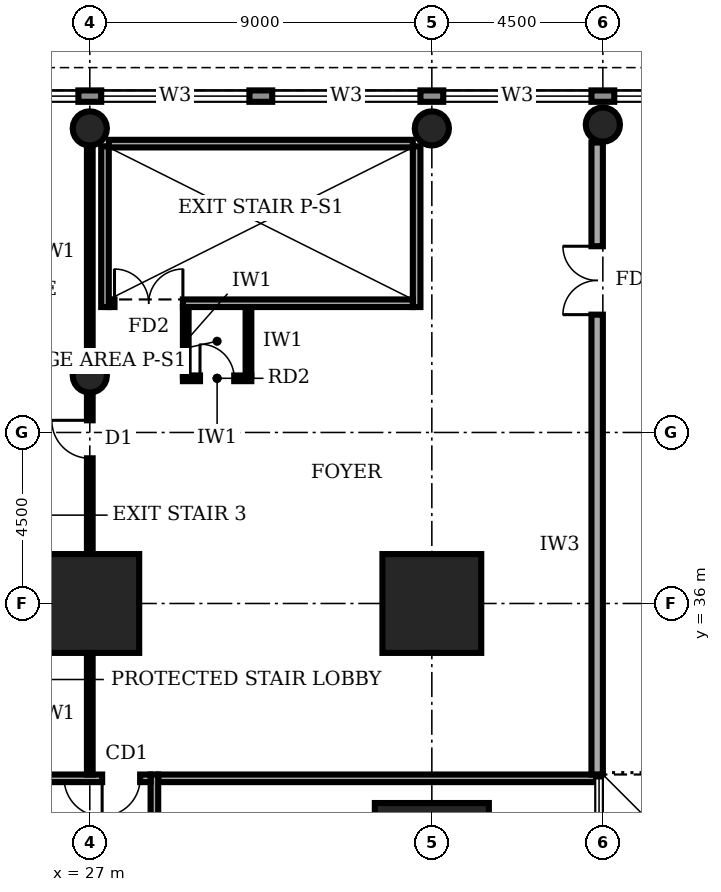
"""IFC4 building model, lengths in metres.
Left out: names, types, materials, properties, quantities, classifications, styles, units other than length and angle.
Written with IfcOpenShell. Run it as: python <this file> out.ifc"""

import sys

from ifc_helpers import new_model, si_unit, direction, frame, frame_2d, origin, origin_2d, place, context, subcontext, project, spatial, rectangle, circle, extrude, element, fill, save


model = new_model("IFC4")
c1 = context("Model", 3, precision=1e-05, world=origin(), true_north=direction((0.0, 1.0)))
c2 = subcontext(c1, "Body", "Model", "MODEL_VIEW")
j1 = project(units=[si_unit("LENGTHUNIT", "METRE"), si_unit("PLANEANGLEUNIT", "RADIAN")], contexts=[c1])
p1 = place(None, origin())
s1 = spatial("IfcSite", under=j1, at=p1, CompositionType="ELEMENT")
p2 = place(p1, origin())
s2 = spatial("IfcBuilding", under=s1, at=p2, CompositionType="ELEMENT")
p3 = place(p2, frame((0.0, 0.0, 16.0)))
s3 = spatial("IfcBuildingStorey", under=s2, at=p3, CompositionType="ELEMENT", Elevation=16.0)
p4 = place(p3, frame((36.0, 29.25, 0.0), z_axis=(0.0, 0.0, 1.0), x_axis=(1.0, 0.0, 0.0)))
e1 = element("IfcColumn", 1, at=p4, inside=s3, PredefinedType="COLUMN", context=c2, shape_type="SweptSolid", body=[
    extrude(rectangle(XDim=3.0, YDim=3.0, at=origin_2d()), origin(), (0.0, 0.0, 1.0), 5.0),
])
for number, where, z_axis, x_axis in (
    (2, (27.0, 36.0, 0.0), (0.0, 0.0, 1.0), (1.0, 0.0, 0.0)),
    (3, (36.0, 36.0, 0.0), (0.0, 0.0, 1.0), (1.0, 0.0, 0.0)),
):
    element("IfcColumn", number, at=place(p3, frame(where, z_axis=z_axis, x_axis=x_axis)), inside=s3, PredefinedType="COLUMN", context=c2, shape_type="SweptSolid", body=[
        extrude(rectangle(XDim=2.6, YDim=2.6, at=origin_2d()), origin(), (0.0, 0.0, 1.0), 5.0),
    ])
for number, where, z_axis, x_axis in (
    (4, (27.0, 42.0, 0.0), (0.0, 0.0, 1.0), (1.0, 0.0, 0.0)),
    (5, (27.0, 48.5, 0.0), (0.0, 0.0, 1.0), (1.0, 0.0, 0.0)),
    (6, (36.0, 48.5, 0.0), (0.0, 0.0, 1.0), (1.0, 0.0, 0.0)),
    (7, (40.5, 48.6, 0.0), (0.0, 0.0, 1.0), (1.0, 0.0, 0.0)),
):
    element("IfcColumn", number, at=place(p3, frame(where, z_axis=z_axis, x_axis=x_axis)), inside=s3, PredefinedType="COLUMN", context=c2, shape_type="SweptSolid", body=[
        extrude(circle(Radius=0.45, at=origin_2d()), origin(), (0.0, 0.0, 1.0), 5.0),
    ])
p5 = place(p3, frame((98.98, 49.35, 0.0), z_axis=(0.0, 0.0, 1.0), x_axis=(-1.0, 0.0, 0.0)))
e8 = element("IfcWall", 8, at=p5, inside=s3, PredefinedType="STANDARD", context=c2, shape_type="SweptSolid", body=[
    extrude(rectangle(XDim=98.96, YDim=0.3, at=frame_2d((49.48, 0.0))), origin(), (0.0, 0.0, 1.0), 4.7),
])
p6 = place(p5, frame((94.78, 0.0, 0.95)))
e9 = element("IfcOpeningElement", 9, at=p6, cuts=e8, PredefinedType="OPENING", context=c2, shape_type="SweptSolid", body=[
    extrude(rectangle(XDim=3.9, YDim=1.8, at=frame_2d((1.95, 0.9))), frame((0.0, 0.16, 0.0), z_axis=(0.0, -1.0, 0.0), x_axis=(1.0, 0.0, 0.0)), (0.0, 0.0, 1.0), 0.32),
])
p7 = place(p5, frame((90.28, 0.0, 0.95)))
e10 = element("IfcOpeningElement", 10, at=p7, cuts=e8, PredefinedType="OPENING", context=c2, shape_type="SweptSolid", body=[
    extrude(rectangle(XDim=3.9, YDim=1.8, at=frame_2d((1.95, 0.9))), frame((0.0, 0.16, 0.0), z_axis=(0.0, -1.0, 0.0), x_axis=(1.0, 0.0, 0.0)), (0.0, 0.0, 1.0), 0.32),
])
p8 = place(p5, frame((85.78, 0.0, 0.95)))
e11 = element("IfcOpeningElement", 11, at=p8, cuts=e8, PredefinedType="OPENING", context=c2, shape_type="SweptSolid", body=[
    extrude(rectangle(XDim=3.9, YDim=1.8, at=frame_2d((1.95, 0.9))), frame((0.0, 0.16, 0.0), z_axis=(0.0, -1.0, 0.0), x_axis=(1.0, 0.0, 0.0)), (0.0, 0.0, 1.0), 0.32),
])
p9 = place(p5, frame((81.28, 0.0, 0.95)))
e12 = element("IfcOpeningElement", 12, at=p9, cuts=e8, PredefinedType="OPENING", context=c2, shape_type="SweptSolid", body=[
    extrude(rectangle(XDim=3.9, YDim=1.8, at=frame_2d((1.95, 0.9))), frame((0.0, 0.16, 0.0), z_axis=(0.0, -1.0, 0.0), x_axis=(1.0, 0.0, 0.0)), (0.0, 0.0, 1.0), 0.32),
])
p10 = place(p5, frame((76.78, 0.0, 0.95)))
e13 = element("IfcOpeningElement", 13, at=p10, cuts=e8, PredefinedType="OPENING", context=c2, shape_type="SweptSolid", body=[
    extrude(rectangle(XDim=3.9, YDim=1.8, at=frame_2d((1.95, 0.9))), frame((0.0, 0.16, 0.0), z_axis=(0.0, -1.0, 0.0), x_axis=(1.0, 0.0, 0.0)), (0.0, 0.0, 1.0), 0.32),
])
p11 = place(p5, frame((72.28, 0.0, 0.95)))
e14 = element("IfcOpeningElement", 14, at=p11, cuts=e8, PredefinedType="OPENING", context=c2, shape_type="SweptSolid", body=[
    extrude(rectangle(XDim=3.9, YDim=1.8, at=frame_2d((1.95, 0.9))), frame((0.0, 0.16, 0.0), z_axis=(0.0, -1.0, 0.0), x_axis=(1.0, 0.0, 0.0)), (0.0, 0.0, 1.0), 0.32),
])
p12 = place(p5, frame((67.78, 0.0, 0.95)))
e15 = element("IfcOpeningElement", 15, at=p12, cuts=e8, PredefinedType="OPENING", context=c2, shape_type="SweptSolid", body=[
    extrude(rectangle(XDim=3.9, YDim=1.8, at=frame_2d((1.95, 0.9))), frame((0.0, 0.16, 0.0), z_axis=(0.0, -1.0, 0.0), x_axis=(1.0, 0.0, 0.0)), (0.0, 0.0, 1.0), 0.32),
])
p13 = place(p5, frame((63.28, 0.0, 0.95)))
e16 = element("IfcOpeningElement", 16, at=p13, cuts=e8, PredefinedType="OPENING", context=c2, shape_type="SweptSolid", body=[
    extrude(rectangle(XDim=3.9, YDim=1.8, at=frame_2d((1.95, 0.9))), frame((0.0, 0.16, 0.0), z_axis=(0.0, -1.0, 0.0), x_axis=(1.0, 0.0, 0.0)), (0.0, 0.0, 1.0), 0.32),
])
p14 = place(p5, frame((58.78, 0.0, 0.95)))
e17 = element("IfcOpeningElement", 17, at=p14, cuts=e8, PredefinedType="OPENING", context=c2, shape_type="SweptSolid", body=[
    extrude(rectangle(XDim=3.9, YDim=1.8, at=frame_2d((1.95, 0.9))), frame((0.0, 0.16, 0.0), z_axis=(0.0, -1.0, 0.0), x_axis=(1.0, 0.0, 0.0)), (0.0, 0.0, 1.0), 0.32),
])
p15 = place(p5, frame((54.28, 0.0, 0.95)))
e18 = element("IfcOpeningElement", 18, at=p15, cuts=e8, PredefinedType="OPENING", context=c2, shape_type="SweptSolid", body=[
    extrude(rectangle(XDim=3.9, YDim=1.8, at=frame_2d((1.95, 0.9))), frame((0.0, 0.16, 0.0), z_axis=(0.0, -1.0, 0.0), x_axis=(1.0, 0.0, 0.0)), (0.0, 0.0, 1.0), 0.32),
])
p16 = place(p5, frame((49.78, 0.0, 0.95)))
e19 = element("IfcOpeningElement", 19, at=p16, cuts=e8, PredefinedType="OPENING", context=c2, shape_type="SweptSolid", body=[
    extrude(rectangle(XDim=3.9, YDim=1.8, at=frame_2d((1.95, 0.9))), frame((0.0, 0.16, 0.0), z_axis=(0.0, -1.0, 0.0), x_axis=(1.0, 0.0, 0.0)), (0.0, 0.0, 1.0), 0.32),
])
p17 = place(p5, frame((45.28, 0.0, 0.95)))
e20 = element("IfcOpeningElement", 20, at=p17, cuts=e8, PredefinedType="OPENING", context=c2, shape_type="SweptSolid", body=[
    extrude(rectangle(XDim=3.9, YDim=1.8, at=frame_2d((1.95, 0.9))), frame((0.0, 0.16, 0.0), z_axis=(0.0, -1.0, 0.0), x_axis=(1.0, 0.0, 0.0)), (0.0, 0.0, 1.0), 0.32),
])
p18 = place(p5, frame((40.78, 0.0, 0.95)))
e21 = element("IfcOpeningElement", 21, at=p18, cuts=e8, PredefinedType="OPENING", context=c2, shape_type="SweptSolid", body=[
    extrude(rectangle(XDim=3.9, YDim=1.8, at=frame_2d((1.95, 0.9))), frame((0.0, 0.16, 0.0), z_axis=(0.0, -1.0, 0.0), x_axis=(1.0, 0.0, 0.0)), (0.0, 0.0, 1.0), 0.32),
])
p19 = place(p5, frame((36.28, 0.0, 0.95)))
e22 = element("IfcOpeningElement", 22, at=p19, cuts=e8, PredefinedType="OPENING", context=c2, shape_type="SweptSolid", body=[
    extrude(rectangle(XDim=3.9, YDim=1.8, at=frame_2d((1.95, 0.9))), frame((0.0, 0.16, 0.0), z_axis=(0.0, -1.0, 0.0), x_axis=(1.0, 0.0, 0.0)), (0.0, 0.0, 1.0), 0.32),
])
p20 = place(p5, frame((31.78, 0.0, 0.95)))
e23 = element("IfcOpeningElement", 23, at=p20, cuts=e8, PredefinedType="OPENING", context=c2, shape_type="SweptSolid", body=[
    extrude(rectangle(XDim=3.9, YDim=1.8, at=frame_2d((1.95, 0.9))), frame((0.0, 0.16, 0.0), z_axis=(0.0, -1.0, 0.0), x_axis=(1.0, 0.0, 0.0)), (0.0, 0.0, 1.0), 0.32),
])
p21 = place(p5, frame((27.28, 0.0, 0.95)))
e24 = element("IfcOpeningElement", 24, at=p21, cuts=e8, PredefinedType="OPENING", context=c2, shape_type="SweptSolid", body=[
    extrude(rectangle(XDim=3.9, YDim=1.8, at=frame_2d((1.95, 0.9))), frame((0.0, 0.16, 0.0), z_axis=(0.0, -1.0, 0.0), x_axis=(1.0, 0.0, 0.0)), (0.0, 0.0, 1.0), 0.32),
])
p22 = place(p5, frame((22.78, 0.0, 0.95)))
e25 = element("IfcOpeningElement", 25, at=p22, cuts=e8, PredefinedType="OPENING", context=c2, shape_type="SweptSolid", body=[
    extrude(rectangle(XDim=3.9, YDim=1.8, at=frame_2d((1.95, 0.9))), frame((0.0, 0.16, 0.0), z_axis=(0.0, -1.0, 0.0), x_axis=(1.0, 0.0, 0.0)), (0.0, 0.0, 1.0), 0.32),
])
p23 = place(p5, frame((18.28, 0.0, 0.95)))
e26 = element("IfcOpeningElement", 26, at=p23, cuts=e8, PredefinedType="OPENING", context=c2, shape_type="SweptSolid", body=[
    extrude(rectangle(XDim=3.9, YDim=1.8, at=frame_2d((1.95, 0.9))), frame((0.0, 0.16, 0.0), z_axis=(0.0, -1.0, 0.0), x_axis=(1.0, 0.0, 0.0)), (0.0, 0.0, 1.0), 0.32),
])
p24 = place(p5, frame((13.78, 0.0, 0.95)))
e27 = element("IfcOpeningElement", 27, at=p24, cuts=e8, PredefinedType="OPENING", context=c2, shape_type="SweptSolid", body=[
    extrude(rectangle(XDim=3.9, YDim=1.8, at=frame_2d((1.95, 0.9))), frame((0.0, 0.16, 0.0), z_axis=(0.0, -1.0, 0.0), x_axis=(1.0, 0.0, 0.0)), (0.0, 0.0, 1.0), 0.32),
])
p25 = place(p5, frame((9.28, 0.0, 0.95)))
e28 = element("IfcOpeningElement", 28, at=p25, cuts=e8, PredefinedType="OPENING", context=c2, shape_type="SweptSolid", body=[
    extrude(rectangle(XDim=3.9, YDim=1.8, at=frame_2d((1.95, 0.9))), frame((0.0, 0.16, 0.0), z_axis=(0.0, -1.0, 0.0), x_axis=(1.0, 0.0, 0.0)), (0.0, 0.0, 1.0), 0.32),
])
p26 = place(p5, frame((4.78, 0.0, 0.95)))
e29 = element("IfcOpeningElement", 29, at=p26, cuts=e8, PredefinedType="OPENING", context=c2, shape_type="SweptSolid", body=[
    extrude(rectangle(XDim=3.9, YDim=1.8, at=frame_2d((1.95, 0.9))), frame((0.0, 0.16, 0.0), z_axis=(0.0, -1.0, 0.0), x_axis=(1.0, 0.0, 0.0)), (0.0, 0.0, 1.0), 0.32),
])
p27 = place(p3, frame((28.7, 9.2, 0.0), z_axis=(0.0, 0.0, 1.0), x_axis=(0.0, 1.0, 0.0)))
e30 = element("IfcWall", 30, at=p27, inside=s3, PredefinedType="SOLIDWALL", context=c2, shape_type="SweptSolid", body=[
    extrude(rectangle(XDim=22.3, YDim=0.2, at=frame_2d((11.15, 0.0))), origin(), (0.0, 0.0, 1.0), 4.7),
])
p28 = place(p27, frame((3.4, 0.0, 0.0)))
e31 = element("IfcOpeningElement", 31, at=p28, cuts=e30, PredefinedType="OPENING", context=c2, shape_type="SweptSolid", body=[
    extrude(rectangle(XDim=1.8, YDim=2.1, at=frame_2d((0.9, 1.05))), frame((0.0, 0.11, 0.0), z_axis=(0.0, -1.0, 0.0), x_axis=(1.0, 0.0, 0.0)), (0.0, 0.0, 1.0), 0.22),
])
p29 = place(p27, frame((14.65, 0.0, 0.0)))
e32 = element("IfcOpeningElement", 32, at=p29, cuts=e30, PredefinedType="OPENING", context=c2, shape_type="SweptSolid", body=[
    extrude(rectangle(XDim=1.8, YDim=2.1, at=frame_2d((0.9, 1.05))), frame((0.0, 0.11, 0.0), z_axis=(0.0, -1.0, 0.0), x_axis=(1.0, 0.0, 0.0)), (0.0, 0.0, 1.0), 0.22),
])
p30 = place(p3, frame((28.6, 31.4, 0.0), z_axis=(0.0, 0.0, 1.0), x_axis=(-1.0, 0.0, 0.0)))
e33 = element("IfcWall", 33, at=p30, inside=s3, PredefinedType="SOLIDWALL", context=c2, shape_type="SweptSolid", body=[
    extrude(rectangle(XDim=16.9, YDim=0.2, at=frame_2d((8.45, 0.0))), origin(), (0.0, 0.0, 1.0), 4.7),
])
p31 = place(p30, frame((15.425, 0.0, 0.0)))
e34 = element("IfcOpeningElement", 34, at=p31, cuts=e33, PredefinedType="OPENING", context=c2, shape_type="SweptSolid", body=[
    extrude(rectangle(XDim=1.0, YDim=2.1, at=frame_2d((0.5, 1.05))), frame((0.0, 0.11, 0.0), z_axis=(0.0, -1.0, 0.0), x_axis=(1.0, 0.0, 0.0)), (0.0, 0.0, 1.0), 0.22),
])
p32 = place(p30, frame((9.7, 0.0, 0.0)))
e35 = element("IfcOpeningElement", 35, at=p32, cuts=e33, PredefinedType="OPENING", context=c2, shape_type="SweptSolid", body=[
    extrude(rectangle(XDim=1.8, YDim=2.1, at=frame_2d((0.9, 1.05))), frame((0.0, 0.11, 0.0), z_axis=(0.0, -1.0, 0.0), x_axis=(1.0, 0.0, 0.0)), (0.0, 0.0, 1.0), 0.22),
])
p33 = place(p30, frame((0.275, 0.0, 0.0)))
e36 = element("IfcOpeningElement", 36, at=p33, cuts=e33, PredefinedType="OPENING", context=c2, shape_type="SweptSolid", body=[
    extrude(rectangle(XDim=1.0, YDim=2.1, at=frame_2d((0.5, 1.05))), frame((0.0, 0.11, 0.0), z_axis=(0.0, -1.0, 0.0), x_axis=(1.0, 0.0, 0.0)), (0.0, 0.0, 1.0), 0.22),
])
p34 = place(p30, frame((3.35, 0.0, 0.0)))
e37 = element("IfcOpeningElement", 37, at=p34, cuts=e33, PredefinedType="OPENING", context=c2, shape_type="SweptSolid", body=[
    extrude(rectangle(XDim=1.0, YDim=2.1, at=frame_2d((0.5, 1.05))), frame((0.0, 0.11, 0.0), z_axis=(0.0, -1.0, 0.0), x_axis=(1.0, 0.0, 0.0)), (0.0, 0.0, 1.0), 0.22),
])
p35 = place(p3, frame((28.8, 31.4, 0.0), z_axis=(0.0, 0.0, 1.0), x_axis=(1.0, 0.0, 0.0)))
e38 = element("IfcWall", 38, at=p35, inside=s3, PredefinedType="SOLIDWALL", context=c2, shape_type="SweptSolid", body=[
    extrude(rectangle(XDim=11.52, YDim=0.2, at=frame_2d((5.76, 0.0))), origin(), (0.0, 0.0, 1.0), 4.7),
])
p36 = place(p3, frame((27.0, 31.5, 0.0), z_axis=(0.0, 0.0, 1.0), x_axis=(0.0, 1.0, 0.0)))
e39 = element("IfcWall", 39, at=p36, inside=s3, PredefinedType="PARTITIONING", context=c2, shape_type="SweptSolid", body=[
    extrude(rectangle(XDim=3.18, YDim=0.15, at=frame_2d((1.59, 0.0))), origin(), (0.0, 0.0, 1.0), 3.8),
])
p37 = place(p3, frame((27.0, 37.32, 0.0), z_axis=(0.0, 0.0, 1.0), x_axis=(0.0, 1.0, 0.0)))
e40 = element("IfcWall", 40, at=p37, inside=s3, PredefinedType="PARTITIONING", context=c2, shape_type="SweptSolid", body=[
    extrude(rectangle(XDim=4.21, YDim=0.15, at=frame_2d((2.105, 0.0))), origin(), (0.0, 0.0, 1.0), 3.7),
])
p38 = place(p37, frame((2.5, 0.0, 0.0)))
e41 = element("IfcOpeningElement", 41, at=p38, cuts=e40, PredefinedType="OPENING", context=c2, shape_type="SweptSolid", body=[
    extrude(rectangle(XDim=1.0, YDim=2.1, at=frame_2d((0.5, 1.05))), frame((0.0, 0.085, 0.0), z_axis=(0.0, -1.0, 0.0), x_axis=(1.0, 0.0, 0.0)), (0.0, 0.0, 1.0), 0.17),
])
p39 = place(p3, frame((27.0, 42.47, 0.0), z_axis=(0.0, 0.0, 1.0), x_axis=(0.0, 1.0, 0.0)))
e42 = element("IfcWall", 42, at=p39, inside=s3, PredefinedType="PARTITIONING", context=c2, shape_type="SweptSolid", body=[
    extrude(rectangle(XDim=5.56, YDim=0.15, at=frame_2d((2.78, 0.0))), origin(), (0.0, 0.0, 1.0), 3.7),
])
p40 = place(p3, frame((27.5, 43.9, 0.0), z_axis=(0.0, 0.0, 1.0), x_axis=(1.0, 0.0, 0.0)))
e43 = element("IfcWall", 43, at=p40, inside=s3, PredefinedType="SOLIDWALL", context=c2, shape_type="SweptSolid", body=[
    extrude(rectangle(XDim=8.0, YDim=0.2, at=frame_2d((4.0, 0.0))), origin(), (0.0, 0.0, 1.0), 4.7),
])
p41 = place(p40, frame((0.15, 0.0, 0.0)))
e44 = element("IfcOpeningElement", 44, at=p41, cuts=e43, PredefinedType="OPENING", context=c2, shape_type="SweptSolid", body=[
    extrude(rectangle(XDim=1.8, YDim=2.1, at=frame_2d((0.9, 1.05))), frame((0.0, 0.11, 0.0), z_axis=(0.0, -1.0, 0.0), x_axis=(1.0, 0.0, 0.0)), (0.0, 0.0, 1.0), 0.22),
])
p42 = place(p3, frame((27.5, 48.1, 0.0), z_axis=(0.0, 0.0, 1.0), x_axis=(1.0, 0.0, 0.0)))
e45 = element("IfcWall", 45, at=p42, inside=s3, PredefinedType="SOLIDWALL", context=c2, shape_type="SweptSolid", body=[
    extrude(rectangle(XDim=8.0, YDim=0.2, at=frame_2d((4.0, 0.0))), origin(), (0.0, 0.0, 1.0), 4.7),
])
for number, where, z_axis, x_axis in (
    (46, (27.4, 43.8, 0.0), (0.0, 0.0, 1.0), (0.0, 1.0, 0.0)),
    (47, (35.6, 43.8, 0.0), (0.0, 0.0, 1.0), (0.0, 1.0, 0.0)),
):
    element("IfcWall", number, at=place(p3, frame(where, z_axis=z_axis, x_axis=x_axis)), inside=s3, PredefinedType="SOLIDWALL", context=c2, shape_type="SweptSolid", body=[
        extrude(rectangle(XDim=4.23, YDim=0.2, at=frame_2d((2.115, 0.0))), origin(), (0.0, 0.0, 1.0), 4.7),
    ])
p43 = place(p3, frame((40.35, 31.5, 0.0), z_axis=(0.0, 0.0, 1.0), x_axis=(0.0, 1.0, 0.0)))
e48 = element("IfcWall", 48, at=p43, inside=s3, PredefinedType="SOLIDWALL", context=c2, shape_type="SweptSolid", body=[
    extrude(rectangle(XDim=16.63, YDim=0.3, at=frame_2d((8.315, 0.0))), origin(), (0.0, 0.0, 1.0), 4.7),
])
p44 = place(p43, frame((12.1, 0.0, 0.0)))
e49 = element("IfcOpeningElement", 49, at=p44, cuts=e48, PredefinedType="OPENING", context=c2, shape_type="SweptSolid", body=[
    extrude(rectangle(XDim=1.8, YDim=2.1, at=frame_2d((0.9, 1.05))), frame((0.0, 0.16, 0.0), z_axis=(0.0, -1.0, 0.0), x_axis=(1.0, 0.0, 0.0)), (0.0, 0.0, 1.0), 0.32),
])
p45 = place(p3, frame((31.175, 42.0, 0.0), z_axis=(0.0, 0.0, 1.0), x_axis=(0.0, 1.0, 0.0)))
e50 = element("IfcWall", 50, at=p45, inside=s3, PredefinedType="PARTITIONING", context=c2, shape_type="SweptSolid", body=[
    extrude(rectangle(XDim=1.8, YDim=0.15, at=frame_2d((0.9, 0.0))), origin(), (0.0, 0.0, 1.0), 4.7),
])
p46 = place(p3, frame((29.45, 41.925, 0.0), z_axis=(0.0, 0.0, 1.0), x_axis=(1.0, 0.0, 0.0)))
e51 = element("IfcWall", 51, at=p46, inside=s3, PredefinedType="PARTITIONING", context=c2, shape_type="SweptSolid", body=[
    extrude(rectangle(XDim=1.8, YDim=0.15, at=frame_2d((0.9, 0.0))), origin(), (0.0, 0.0, 1.0), 4.7),
])
p47 = place(p46, frame((0.45, 0.0, 0.0)))
e52 = element("IfcOpeningElement", 52, at=p47, cuts=e51, PredefinedType="OPENING", context=c2, shape_type="SweptSolid", body=[
    extrude(rectangle(XDim=0.9, YDim=2.1, at=frame_2d((0.45, 1.05))), frame((0.0, 0.085, 0.0), z_axis=(0.0, -1.0, 0.0), x_axis=(1.0, 0.0, 0.0)), (0.0, 0.0, 1.0), 0.17),
])
p48 = place(p3, frame((29.525, 42.0, 0.0), z_axis=(0.0, 0.0, 1.0), x_axis=(0.0, 1.0, 0.0)))
e53 = element("IfcWall", 53, at=p48, inside=s3, PredefinedType="PARTITIONING", context=c2, shape_type="SweptSolid", body=[
    extrude(rectangle(XDim=1.8, YDim=0.15, at=frame_2d((0.9, 0.0))), origin(), (0.0, 0.0, 1.0), 4.7),
])
p49 = place(p11, origin())
e54 = element("IfcWindow", 54, at=p49, inside=s3, PartitioningType="SINGLE_PANEL", PredefinedType="WINDOW", context=c2, shape_type="SweptSolid", body=[
    extrude(rectangle(XDim=3.9, YDim=1.8, at=frame_2d((1.95, 0.9))), frame((0.0, 0.03, 0.0), z_axis=(0.0, -1.0, 0.0), x_axis=(1.0, 0.0, 0.0)), (0.0, 0.0, 1.0), 0.06),
])
fill(e14, e54)
p50 = place(p12, origin())
e55 = element("IfcWindow", 55, at=p50, inside=s3, PartitioningType="SINGLE_PANEL", PredefinedType="WINDOW", context=c2, shape_type="SweptSolid", body=[
    extrude(rectangle(XDim=3.9, YDim=1.8, at=frame_2d((1.95, 0.9))), frame((0.0, 0.03, 0.0), z_axis=(0.0, -1.0, 0.0), x_axis=(1.0, 0.0, 0.0)), (0.0, 0.0, 1.0), 0.06),
])
fill(e15, e55)
p51 = place(p13, origin())
e56 = element("IfcWindow", 56, at=p51, inside=s3, PartitioningType="SINGLE_PANEL", PredefinedType="WINDOW", context=c2, shape_type="SweptSolid", body=[
    extrude(rectangle(XDim=3.9, YDim=1.8, at=frame_2d((1.95, 0.9))), frame((0.0, 0.03, 0.0), z_axis=(0.0, -1.0, 0.0), x_axis=(1.0, 0.0, 0.0)), (0.0, 0.0, 1.0), 0.06),
])
fill(e16, e56)
p52 = place(p14, origin())
e57 = element("IfcWindow", 57, at=p52, inside=s3, PartitioningType="SINGLE_PANEL", PredefinedType="WINDOW", context=c2, shape_type="SweptSolid", body=[
    extrude(rectangle(XDim=3.9, YDim=1.8, at=frame_2d((1.95, 0.9))), frame((0.0, 0.03, 0.0), z_axis=(0.0, -1.0, 0.0), x_axis=(1.0, 0.0, 0.0)), (0.0, 0.0, 1.0), 0.06),
])
fill(e17, e57)
p53 = place(p15, origin())
e58 = element("IfcWindow", 58, at=p53, inside=s3, PartitioningType="SINGLE_PANEL", PredefinedType="WINDOW", context=c2, shape_type="SweptSolid", body=[
    extrude(rectangle(XDim=3.9, YDim=1.8, at=frame_2d((1.95, 0.9))), frame((0.0, 0.03, 0.0), z_axis=(0.0, -1.0, 0.0), x_axis=(1.0, 0.0, 0.0)), (0.0, 0.0, 1.0), 0.06),
])
fill(e18, e58)
p54 = place(p33, origin())
e59 = element("IfcDoor", 59, at=p54, inside=s3, OperationType="SINGLE_SWING_RIGHT", PredefinedType="DOOR", context=c2, shape_type="SweptSolid", body=[
    extrude(rectangle(XDim=1.0, YDim=2.1, at=frame_2d((0.5, 1.05))), frame((0.0, 0.025, 0.0), z_axis=(0.0, -1.0, 0.0), x_axis=(1.0, 0.0, 0.0)), (0.0, 0.0, 1.0), 0.05),
])
fill(e36, e59)
p55 = place(p38, origin())
e60 = element("IfcDoor", 60, at=p55, inside=s3, OperationType="SINGLE_SWING_RIGHT", PredefinedType="DOOR", context=c2, shape_type="SweptSolid", body=[
    extrude(rectangle(XDim=1.0, YDim=2.1, at=frame_2d((0.5, 1.05))), frame((0.0, 0.025, 0.0), z_axis=(0.0, -1.0, 0.0), x_axis=(1.0, 0.0, 0.0)), (0.0, 0.0, 1.0), 0.05),
])
fill(e41, e60)
p56 = place(p41, origin())
e61 = element("IfcDoor", 61, at=p56, inside=s3, OperationType="DOUBLE_DOOR_SINGLE_SWING", PredefinedType="DOOR", context=c2, shape_type="SweptSolid", body=[
    extrude(rectangle(XDim=1.8, YDim=2.1, at=frame_2d((0.9, 1.05))), frame((0.0, 0.025, 0.0), z_axis=(0.0, -1.0, 0.0), x_axis=(1.0, 0.0, 0.0)), (0.0, 0.0, 1.0), 0.05),
])
fill(e44, e61)
p57 = place(p44, origin())
e62 = element("IfcDoor", 62, at=p57, inside=s3, OperationType="DOUBLE_DOOR_SINGLE_SWING", PredefinedType="DOOR", context=c2, shape_type="SweptSolid", body=[
    extrude(rectangle(XDim=1.8, YDim=2.1, at=frame_2d((0.9, 1.05))), frame((0.0, 0.025, 0.0), z_axis=(0.0, -1.0, 0.0), x_axis=(1.0, 0.0, 0.0)), (0.0, 0.0, 1.0), 0.05),
])
fill(e49, e62)
p58 = place(p47, origin())
e63 = element("IfcDoor", 63, at=p58, inside=s3, OperationType="SINGLE_SWING_LEFT", PredefinedType="DOOR", context=c2, shape_type="SweptSolid", body=[
    extrude(rectangle(XDim=0.9, YDim=2.1, at=frame_2d((0.45, 1.05))), frame((0.0, 0.025, 0.0), z_axis=(0.0, -1.0, 0.0), x_axis=(1.0, 0.0, 0.0)), (0.0, 0.0, 1.0), 0.05),
])
fill(e52, e63)
save(model, sys.argv[1])
